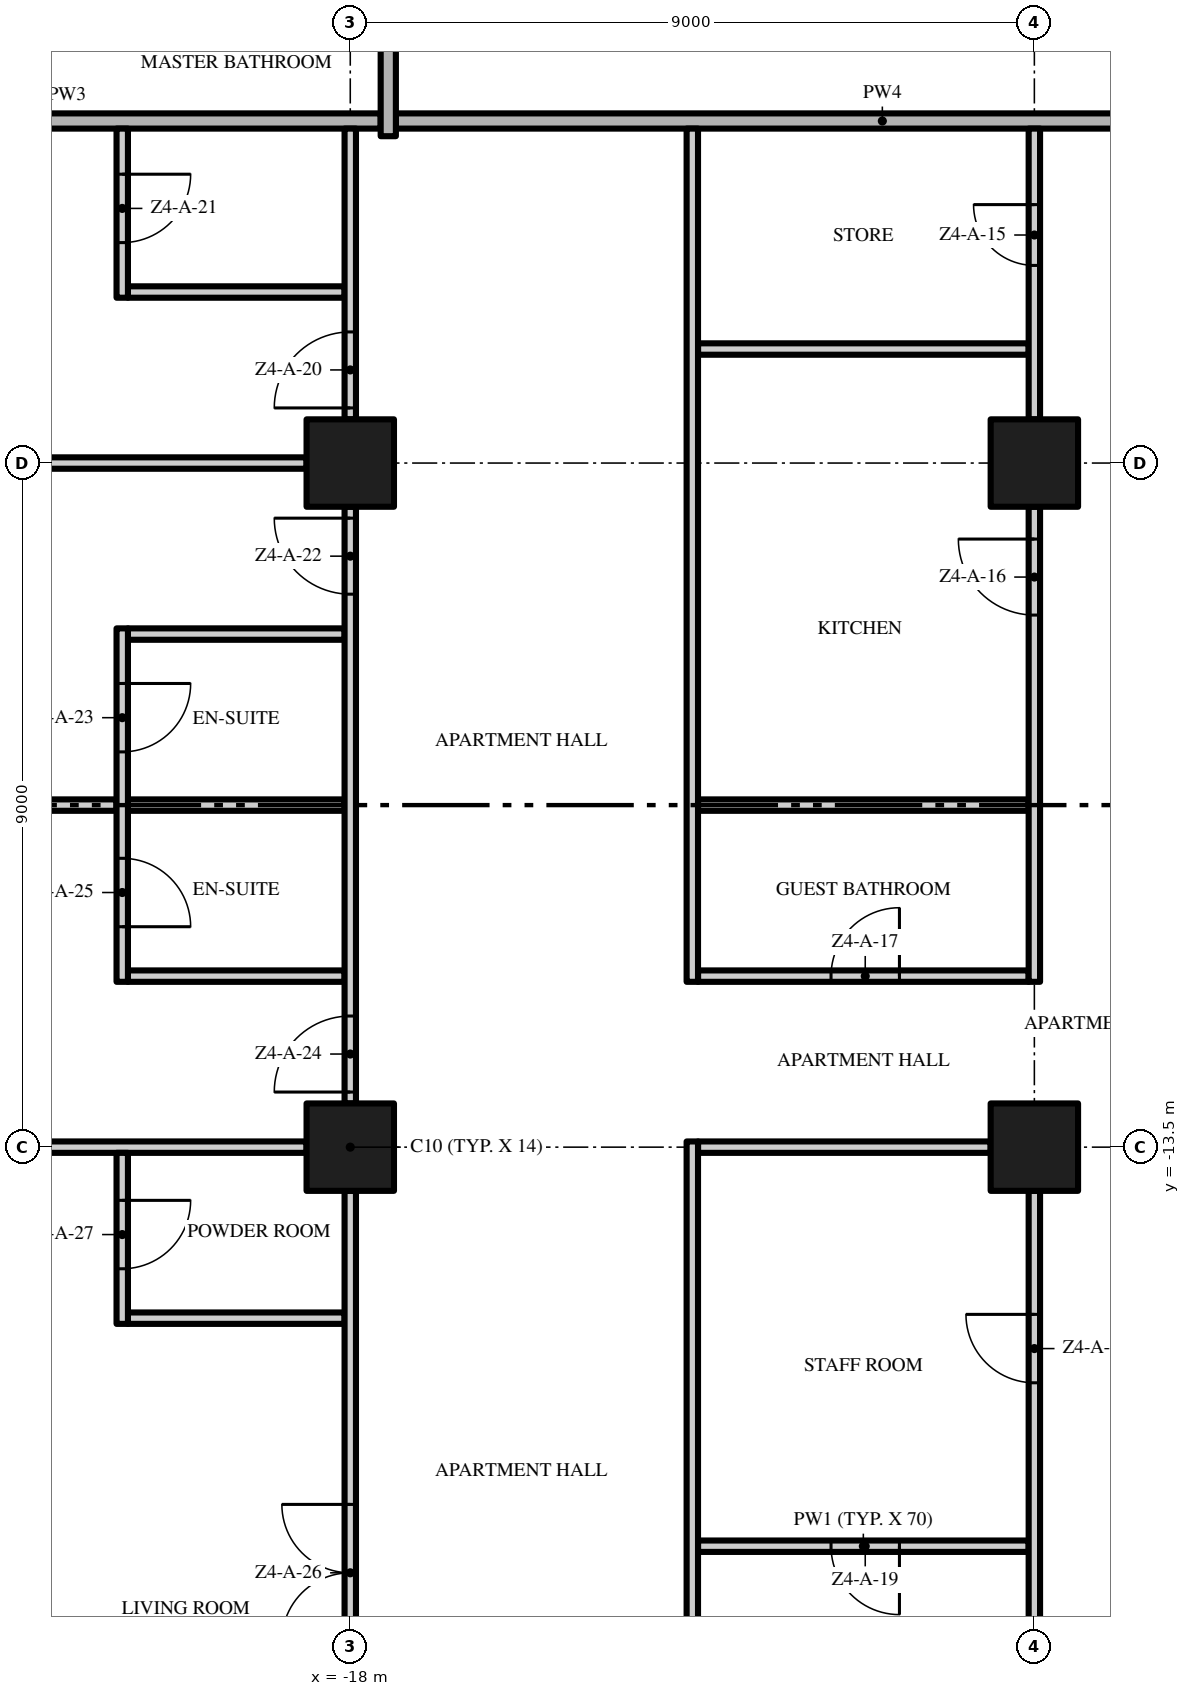
"""IFC4 building model, lengths in metres.
Left out: names, types, materials, properties, quantities, classifications, styles, units other than length and angle.
Written with IfcOpenShell. Run it as: python <this file> out.ifc"""

import sys

from ifc_helpers import new_model, si_unit, direction, frame, frame_2d, origin, origin_2d, place, context, subcontext, project, spatial, rectangle, extrude, element, fill, save


model = new_model("IFC4")
c1 = context("Model", 3, precision=1e-05, world=origin(), true_north=direction((0.0, 1.0)))
c2 = subcontext(c1, "Body", "Model", "MODEL_VIEW")
j1 = project(units=[si_unit("LENGTHUNIT", "METRE"), si_unit("PLANEANGLEUNIT", "RADIAN")], contexts=[c1])
p1 = place(None, origin())
s1 = spatial("IfcSite", under=j1, at=p1, CompositionType="ELEMENT")
p2 = place(p1, origin())
s2 = spatial("IfcBuilding", under=s1, at=p2, CompositionType="ELEMENT")
p3 = place(p2, frame((0.0, 0.0, 184.4)))
s3 = spatial("IfcBuildingStorey", under=s2, at=p3, CompositionType="ELEMENT", Elevation=184.4)
for number, where, z_axis, x_axis in (
    (1, (-18.0, -13.5, 0.0), (0.0, 0.0, 1.0), (1.0, 0.0, 0.0)),
    (2, (-18.0, -4.5, 0.0), (0.0, 0.0, 1.0), (1.0, 0.0, 0.0)),
    (3, (-9.0, -13.5, 0.0), (0.0, 0.0, 1.0), (1.0, 0.0, 0.0)),
    (4, (-9.0, -4.5, 0.0), (0.0, 0.0, 1.0), (1.0, 0.0, 0.0)),
):
    element("IfcColumn", number, at=place(p3, frame(where, z_axis=z_axis, x_axis=x_axis)), inside=s3, PredefinedType="COLUMN", context=c2, shape_type="SweptSolid", body=[
        extrude(rectangle(XDim=1.15, YDim=1.15, at=origin_2d()), origin(), (0.0, 0.0, 1.0), 3.5),
    ])
p4 = place(p3, frame((-9.075, -18.75, 0.0), z_axis=(0.0, 0.0, 1.0), x_axis=(-1.0, 0.0, 0.0)))
e5 = element("IfcWall", 5, at=p4, inside=s3, PredefinedType="PARTITIONING", context=c2, shape_type="SweptSolid", body=[
    extrude(rectangle(XDim=4.35, YDim=0.15, at=frame_2d((2.175, 0.0))), origin(), (0.0, 0.0, 1.0), 3.5),
])
p5 = place(p4, frame((1.7, 0.0, 0.0)))
e6 = element("IfcOpeningElement", 6, at=p5, cuts=e5, PredefinedType="OPENING", context=c2, shape_type="SweptSolid", body=[
    extrude(rectangle(XDim=0.9, YDim=2.1, at=frame_2d((0.45, 1.05))), frame((0.0, 0.085, 0.0), z_axis=(0.0, -1.0, 0.0), x_axis=(1.0, 0.0, 0.0)), (0.0, 0.0, 1.0), 0.17),
])
p6 = place(p3, frame((-20.925, -15.75, 0.0), z_axis=(0.0, 0.0, 1.0), x_axis=(1.0, 0.0, 0.0)))
e7 = element("IfcWall", 7, at=p6, inside=s3, PredefinedType="PARTITIONING", context=c2, shape_type="SweptSolid", body=[
    extrude(rectangle(XDim=2.85, YDim=0.15, at=frame_2d((1.425, 0.0))), origin(), (0.0, 0.0, 1.0), 3.5),
])
p7 = place(p3, frame((-25.95, -13.5, 0.0), z_axis=(0.0, 0.0, 1.0), x_axis=(1.0, 0.0, 0.0)))
e8 = element("IfcWall", 8, at=p7, inside=s3, PredefinedType="PARTITIONING", context=c2, shape_type="SweptSolid", body=[
    extrude(rectangle(XDim=7.375, YDim=0.15, at=frame_2d((3.688, 0.0))), origin(), (0.0, 0.0, 1.0), 3.5),
])
p8 = place(p3, frame((-13.425, -13.5, 0.0), z_axis=(0.0, 0.0, 1.0), x_axis=(1.0, 0.0, 0.0)))
e9 = element("IfcWall", 9, at=p8, inside=s3, PredefinedType="PARTITIONING", context=c2, shape_type="SweptSolid", body=[
    extrude(rectangle(XDim=3.85, YDim=0.15, at=frame_2d((1.925, 0.0))), origin(), (0.0, 0.0, 1.0), 3.5),
])
p9 = place(p3, frame((-20.925, -11.25, 0.0), z_axis=(0.0, 0.0, 1.0), x_axis=(1.0, 0.0, 0.0)))
e10 = element("IfcWall", 10, at=p9, inside=s3, PredefinedType="PARTITIONING", context=c2, shape_type="SweptSolid", body=[
    extrude(rectangle(XDim=2.85, YDim=0.15, at=frame_2d((1.425, 0.0))), origin(), (0.0, 0.0, 1.0), 3.5),
])
p10 = place(p3, frame((-13.425, -11.25, 0.0), z_axis=(0.0, 0.0, 1.0), x_axis=(1.0, 0.0, 0.0)))
e11 = element("IfcWall", 11, at=p10, inside=s3, PredefinedType="PARTITIONING", context=c2, shape_type="SweptSolid", body=[
    extrude(rectangle(XDim=4.35, YDim=0.15, at=frame_2d((2.175, 0.0))), origin(), (0.0, 0.0, 1.0), 3.5),
])
p11 = place(p10, frame((1.75, 0.0, 0.0)))
e12 = element("IfcOpeningElement", 12, at=p11, cuts=e11, PredefinedType="OPENING", context=c2, shape_type="SweptSolid", body=[
    extrude(rectangle(XDim=0.9, YDim=2.1, at=frame_2d((0.45, 1.05))), frame((0.0, 0.085, 0.0), z_axis=(0.0, -1.0, 0.0), x_axis=(1.0, 0.0, 0.0)), (0.0, 0.0, 1.0), 0.17),
])
p12 = place(p3, frame((-26.7, -9.0, 0.0), z_axis=(0.0, 0.0, 1.0), x_axis=(1.0, 0.0, 0.0)))
e13 = element("IfcWall", 13, at=p12, inside=s3, PredefinedType="PARTITIONING", context=c2, shape_type="SweptSolid", body=[
    extrude(rectangle(XDim=5.625, YDim=0.15, at=frame_2d((2.812, 0.0))), origin(), (0.0, 0.0, 1.0), 3.5),
])
p13 = place(p3, frame((-20.925, -9.0, 0.0), z_axis=(0.0, 0.0, 1.0), x_axis=(1.0, 0.0, 0.0)))
e14 = element("IfcWall", 14, at=p13, inside=s3, PredefinedType="PARTITIONING", context=c2, shape_type="SweptSolid", body=[
    extrude(rectangle(XDim=2.85, YDim=0.15, at=frame_2d((1.425, 0.0))), origin(), (0.0, 0.0, 1.0), 3.5),
])
p14 = place(p3, frame((-13.425, -9.0, 0.0), z_axis=(0.0, 0.0, 1.0), x_axis=(1.0, 0.0, 0.0)))
e15 = element("IfcWall", 15, at=p14, inside=s3, PredefinedType="PARTITIONING", context=c2, shape_type="SweptSolid", body=[
    extrude(rectangle(XDim=4.35, YDim=0.15, at=frame_2d((2.175, 0.0))), origin(), (0.0, 0.0, 1.0), 3.5),
])
p15 = place(p3, frame((-20.925, -6.75, 0.0), z_axis=(0.0, 0.0, 1.0), x_axis=(1.0, 0.0, 0.0)))
e16 = element("IfcWall", 16, at=p15, inside=s3, PredefinedType="PARTITIONING", context=c2, shape_type="SweptSolid", body=[
    extrude(rectangle(XDim=2.85, YDim=0.15, at=frame_2d((1.425, 0.0))), origin(), (0.0, 0.0, 1.0), 3.5),
])
p16 = place(p3, frame((-25.95, -4.5, 0.0), z_axis=(0.0, 0.0, 1.0), x_axis=(1.0, 0.0, 0.0)))
e17 = element("IfcWall", 17, at=p16, inside=s3, PredefinedType="PARTITIONING", context=c2, shape_type="SweptSolid", body=[
    extrude(rectangle(XDim=7.375, YDim=0.15, at=frame_2d((3.688, 0.0))), origin(), (0.0, 0.0, 1.0), 3.5),
])
p17 = place(p3, frame((-13.425, -3.0, 0.0), z_axis=(0.0, 0.0, 1.0), x_axis=(1.0, 0.0, 0.0)))
e18 = element("IfcWall", 18, at=p17, inside=s3, PredefinedType="PARTITIONING", context=c2, shape_type="SweptSolid", body=[
    extrude(rectangle(XDim=4.35, YDim=0.15, at=frame_2d((2.175, 0.0))), origin(), (0.0, 0.0, 1.0), 3.5),
])
p18 = place(p3, frame((-20.925, -2.25, 0.0), z_axis=(0.0, 0.0, 1.0), x_axis=(1.0, 0.0, 0.0)))
e19 = element("IfcWall", 19, at=p18, inside=s3, PredefinedType="PARTITIONING", context=c2, shape_type="SweptSolid", body=[
    extrude(rectangle(XDim=2.85, YDim=0.15, at=frame_2d((1.425, 0.0))), origin(), (0.0, 0.0, 1.0), 3.5),
])
p19 = place(p3, frame((-17.4, 0.0, 0.0), z_axis=(0.0, 0.0, 1.0), x_axis=(1.0, 0.0, 0.0)))
e20 = element("IfcWall", 20, at=p19, inside=s3, PredefinedType="PARTITIONING", context=c2, shape_type="SweptSolid", body=[
    extrude(rectangle(XDim=12.8, YDim=0.2, at=frame_2d((6.4, 0.0))), origin(), (0.0, 0.0, 1.0), 3.5),
])
p20 = place(p3, frame((-26.7, 0.0, 0.0), z_axis=(0.0, 0.0, 1.0), x_axis=(1.0, 0.0, 0.0)))
e21 = element("IfcWall", 21, at=p20, inside=s3, PredefinedType="PARTITIONING", context=c2, shape_type="SweptSolid", body=[
    extrude(rectangle(XDim=9.1, YDim=0.2, at=frame_2d((4.55, 0.0))), origin(), (0.0, 0.0, 1.0), 3.5),
])
p21 = place(p3, frame((-21.0, -13.575, 0.0), z_axis=(0.0, 0.0, 1.0), x_axis=(0.0, -1.0, 0.0)))
e22 = element("IfcWall", 22, at=p21, inside=s3, PredefinedType="PARTITIONING", context=c2, shape_type="SweptSolid", body=[
    extrude(rectangle(XDim=2.25, YDim=0.15, at=frame_2d((1.125, 0.0))), origin(), (0.0, 0.0, 1.0), 3.5),
])
p22 = place(p21, frame((0.625, 0.0, 0.0)))
e23 = element("IfcOpeningElement", 23, at=p22, cuts=e22, PredefinedType="OPENING", context=c2, shape_type="SweptSolid", body=[
    extrude(rectangle(XDim=0.9, YDim=2.1, at=frame_2d((0.45, 1.05))), frame((0.0, 0.085, 0.0), z_axis=(0.0, -1.0, 0.0), x_axis=(1.0, 0.0, 0.0)), (0.0, 0.0, 1.0), 0.17),
])
p23 = place(p3, frame((-21.0, -6.675, 0.0), z_axis=(0.0, 0.0, 1.0), x_axis=(0.0, -1.0, 0.0)))
e24 = element("IfcWall", 24, at=p23, inside=s3, PredefinedType="PARTITIONING", context=c2, shape_type="SweptSolid", body=[
    extrude(rectangle(XDim=4.65, YDim=0.15, at=frame_2d((2.325, 0.0))), origin(), (0.0, 0.0, 1.0), 3.5),
])
p24 = place(p23, frame((0.725, 0.0, 0.0)))
e25 = element("IfcOpeningElement", 25, at=p24, cuts=e24, PredefinedType="OPENING", context=c2, shape_type="SweptSolid", body=[
    extrude(rectangle(XDim=0.9, YDim=2.1, at=frame_2d((0.45, 1.05))), frame((0.0, 0.085, 0.0), z_axis=(0.0, -1.0, 0.0), x_axis=(1.0, 0.0, 0.0)), (0.0, 0.0, 1.0), 0.17),
])
p25 = place(p23, frame((3.025, 0.0, 0.0)))
e26 = element("IfcOpeningElement", 26, at=p25, cuts=e24, PredefinedType="OPENING", context=c2, shape_type="SweptSolid", body=[
    extrude(rectangle(XDim=0.9, YDim=2.1, at=frame_2d((0.45, 1.05))), frame((0.0, 0.085, 0.0), z_axis=(0.0, -1.0, 0.0), x_axis=(1.0, 0.0, 0.0)), (0.0, 0.0, 1.0), 0.17),
])
p26 = place(p3, frame((-21.0, -0.1, 0.0), z_axis=(0.0, 0.0, 1.0), x_axis=(0.0, -1.0, 0.0)))
e27 = element("IfcWall", 27, at=p26, inside=s3, PredefinedType="PARTITIONING", context=c2, shape_type="SweptSolid", body=[
    extrude(rectangle(XDim=2.225, YDim=0.15, at=frame_2d((1.113, 0.0))), origin(), (0.0, 0.0, 1.0), 3.5),
])
p27 = place(p26, frame((0.6, 0.0, 0.0)))
e28 = element("IfcOpeningElement", 28, at=p27, cuts=e27, PredefinedType="OPENING", context=c2, shape_type="SweptSolid", body=[
    extrude(rectangle(XDim=0.9, YDim=2.1, at=frame_2d((0.45, 1.05))), frame((0.0, 0.085, 0.0), z_axis=(0.0, -1.0, 0.0), x_axis=(1.0, 0.0, 0.0)), (0.0, 0.0, 1.0), 0.17),
])
p28 = place(p3, frame((-18.0, -21.45, 0.0), z_axis=(0.0, 0.0, 1.0), x_axis=(0.0, 1.0, 0.0)))
e29 = element("IfcWall", 29, at=p28, inside=s3, PredefinedType="PARTITIONING", context=c2, shape_type="SweptSolid", body=[
    extrude(rectangle(XDim=7.375, YDim=0.15, at=frame_2d((3.688, 0.0))), origin(), (0.0, 0.0, 1.0), 3.5),
])
p29 = place(p28, frame((1.45, 0.0, 0.0)))
e30 = element("IfcOpeningElement", 30, at=p29, cuts=e29, PredefinedType="OPENING", context=c2, shape_type="SweptSolid", body=[
    extrude(rectangle(XDim=1.8, YDim=2.4, at=frame_2d((0.9, 1.2))), frame((0.0, 0.085, 0.0), z_axis=(0.0, -1.0, 0.0), x_axis=(1.0, 0.0, 0.0)), (0.0, 0.0, 1.0), 0.17),
])
p30 = place(p3, frame((-18.0, -12.925, 0.0), z_axis=(0.0, 0.0, 1.0), x_axis=(0.0, 1.0, 0.0)))
e31 = element("IfcWall", 31, at=p30, inside=s3, PredefinedType="PARTITIONING", context=c2, shape_type="SweptSolid", body=[
    extrude(rectangle(XDim=7.85, YDim=0.15, at=frame_2d((3.925, 0.0))), origin(), (0.0, 0.0, 1.0), 3.5),
])
p31 = place(p30, frame((6.7, 0.0, 0.0)))
e32 = element("IfcOpeningElement", 32, at=p31, cuts=e31, PredefinedType="OPENING", context=c2, shape_type="SweptSolid", body=[
    extrude(rectangle(XDim=1.0, YDim=2.4, at=frame_2d((0.5, 1.2))), frame((0.0, 0.085, 0.0), z_axis=(0.0, -1.0, 0.0), x_axis=(1.0, 0.0, 0.0)), (0.0, 0.0, 1.0), 0.17),
])
p32 = place(p30, frame((0.15, 0.0, 0.0)))
e33 = element("IfcOpeningElement", 33, at=p32, cuts=e31, PredefinedType="OPENING", context=c2, shape_type="SweptSolid", body=[
    extrude(rectangle(XDim=1.0, YDim=2.4, at=frame_2d((0.5, 1.2))), frame((0.0, 0.085, 0.0), z_axis=(0.0, -1.0, 0.0), x_axis=(1.0, 0.0, 0.0)), (0.0, 0.0, 1.0), 0.17),
])
p33 = place(p3, frame((-18.0, -3.925, 0.0), z_axis=(0.0, 0.0, 1.0), x_axis=(0.0, 1.0, 0.0)))
e34 = element("IfcWall", 34, at=p33, inside=s3, PredefinedType="PARTITIONING", context=c2, shape_type="SweptSolid", body=[
    extrude(rectangle(XDim=3.825, YDim=0.15, at=frame_2d((1.913, 0.0))), origin(), (0.0, 0.0, 1.0), 3.5),
])
p34 = place(p33, frame((0.15, 0.0, 0.0)))
e35 = element("IfcOpeningElement", 35, at=p34, cuts=e34, PredefinedType="OPENING", context=c2, shape_type="SweptSolid", body=[
    extrude(rectangle(XDim=1.0, YDim=2.4, at=frame_2d((0.5, 1.2))), frame((0.0, 0.085, 0.0), z_axis=(0.0, -1.0, 0.0), x_axis=(1.0, 0.0, 0.0)), (0.0, 0.0, 1.0), 0.17),
])
p35 = place(p3, frame((-17.5, -0.2, 0.0), z_axis=(0.0, 0.0, 1.0), x_axis=(0.0, 1.0, 0.0)))
e36 = element("IfcWall", 36, at=p35, inside=s3, PredefinedType="PARTITIONING", context=c2, shape_type="SweptSolid", body=[
    extrude(rectangle(XDim=4.125, YDim=0.2, at=frame_2d((2.062, 0.0))), origin(), (0.0, 0.0, 1.0), 3.5),
])
p36 = place(p3, frame((-13.5, -22.2, 0.0), z_axis=(0.0, 0.0, 1.0), x_axis=(0.0, 1.0, 0.0)))
e37 = element("IfcWall", 37, at=p36, inside=s3, PredefinedType="PARTITIONING", context=c2, shape_type="SweptSolid", body=[
    extrude(rectangle(XDim=8.775, YDim=0.15, at=frame_2d((4.388, 0.0))), origin(), (0.0, 0.0, 1.0), 3.5),
])
p37 = place(p3, frame((-13.5, -11.325, 0.0), z_axis=(0.0, 0.0, 1.0), x_axis=(0.0, 1.0, 0.0)))
e38 = element("IfcWall", 38, at=p37, inside=s3, PredefinedType="PARTITIONING", context=c2, shape_type="SweptSolid", body=[
    extrude(rectangle(XDim=11.225, YDim=0.15, at=frame_2d((5.612, 0.0))), origin(), (0.0, 0.0, 1.0), 3.5),
])
p38 = place(p3, frame((-9.0, -21.45, 0.0), z_axis=(0.0, 0.0, 1.0), x_axis=(0.0, 1.0, 0.0)))
e39 = element("IfcWall", 39, at=p38, inside=s3, PredefinedType="PARTITIONING", context=c2, shape_type="SweptSolid", body=[
    extrude(rectangle(XDim=7.375, YDim=0.15, at=frame_2d((3.688, 0.0))), origin(), (0.0, 0.0, 1.0), 3.5),
])
p39 = place(p38, frame((4.85, 0.0, 0.0)))
e40 = element("IfcOpeningElement", 40, at=p39, cuts=e39, PredefinedType="OPENING", context=c2, shape_type="SweptSolid", body=[
    extrude(rectangle(XDim=0.9, YDim=2.1, at=frame_2d((0.45, 1.05))), frame((0.0, 0.085, 0.0), z_axis=(0.0, -1.0, 0.0), x_axis=(1.0, 0.0, 0.0)), (0.0, 0.0, 1.0), 0.17),
])
p40 = place(p3, frame((-9.0, -11.325, 0.0), z_axis=(0.0, 0.0, 1.0), x_axis=(0.0, 1.0, 0.0)))
e41 = element("IfcWall", 41, at=p40, inside=s3, PredefinedType="PARTITIONING", context=c2, shape_type="SweptSolid", body=[
    extrude(rectangle(XDim=6.25, YDim=0.15, at=frame_2d((3.125, 0.0))), origin(), (0.0, 0.0, 1.0), 3.5),
])
p41 = place(p40, frame((4.825, 0.0, 0.0)))
e42 = element("IfcOpeningElement", 42, at=p41, cuts=e41, PredefinedType="OPENING", context=c2, shape_type="SweptSolid", body=[
    extrude(rectangle(XDim=1.0, YDim=2.4, at=frame_2d((0.5, 1.2))), frame((0.0, 0.085, 0.0), z_axis=(0.0, -1.0, 0.0), x_axis=(1.0, 0.0, 0.0)), (0.0, 0.0, 1.0), 0.17),
])
p42 = place(p3, frame((-9.0, -3.925, 0.0), z_axis=(0.0, 0.0, 1.0), x_axis=(0.0, 1.0, 0.0)))
e43 = element("IfcWall", 43, at=p42, inside=s3, PredefinedType="PARTITIONING", context=c2, shape_type="SweptSolid", body=[
    extrude(rectangle(XDim=3.825, YDim=0.15, at=frame_2d((1.913, 0.0))), origin(), (0.0, 0.0, 1.0), 3.5),
])
p43 = place(p42, frame((2.025, 0.0, 0.0)))
e44 = element("IfcOpeningElement", 44, at=p43, cuts=e43, PredefinedType="OPENING", context=c2, shape_type="SweptSolid", body=[
    extrude(rectangle(XDim=0.8, YDim=2.0, at=frame_2d((0.4, 1.0))), frame((0.0, 0.085, 0.0), z_axis=(0.0, -1.0, 0.0), x_axis=(1.0, 0.0, 0.0)), (0.0, 0.0, 1.0), 0.17),
])
p44 = place(p43, origin())
e45 = element("IfcDoor", 45, at=p44, inside=s3, OperationType="SINGLE_SWING_RIGHT", PredefinedType="DOOR", context=c2, shape_type="SweptSolid", body=[
    extrude(rectangle(XDim=0.8, YDim=2.0, at=frame_2d((0.4, 1.0))), frame((0.0, 0.025, 0.0), z_axis=(0.0, -1.0, 0.0), x_axis=(1.0, 0.0, 0.0)), (0.0, 0.0, 1.0), 0.05),
])
fill(e44, e45)
p45 = place(p41, origin())
e46 = element("IfcDoor", 46, at=p45, inside=s3, OperationType="SINGLE_SWING_RIGHT", PredefinedType="DOOR", context=c2, shape_type="SweptSolid", body=[
    extrude(rectangle(XDim=1.0, YDim=2.4, at=frame_2d((0.5, 1.2))), frame((0.0, 0.025, 0.0), z_axis=(0.0, -1.0, 0.0), x_axis=(1.0, 0.0, 0.0)), (0.0, 0.0, 1.0), 0.05),
])
fill(e42, e46)
p46 = place(p11, origin())
e47 = element("IfcDoor", 47, at=p46, inside=s3, OperationType="SINGLE_SWING_RIGHT", PredefinedType="DOOR", context=c2, shape_type="SweptSolid", body=[
    extrude(rectangle(XDim=0.9, YDim=2.1, at=frame_2d((0.45, 1.05))), frame((0.0, 0.025, 0.0), z_axis=(0.0, -1.0, 0.0), x_axis=(1.0, 0.0, 0.0)), (0.0, 0.0, 1.0), 0.05),
])
fill(e12, e47)
p47 = place(p39, origin())
e48 = element("IfcDoor", 48, at=p47, inside=s3, OperationType="SINGLE_SWING_RIGHT", PredefinedType="DOOR", context=c2, shape_type="SweptSolid", body=[
    extrude(rectangle(XDim=0.9, YDim=2.1, at=frame_2d((0.45, 1.05))), frame((0.0, 0.025, 0.0), z_axis=(0.0, -1.0, 0.0), x_axis=(1.0, 0.0, 0.0)), (0.0, 0.0, 1.0), 0.05),
])
fill(e40, e48)
p48 = place(p5, origin())
e49 = element("IfcDoor", 49, at=p48, inside=s3, OperationType="SINGLE_SWING_LEFT", PredefinedType="DOOR", context=c2, shape_type="SweptSolid", body=[
    extrude(rectangle(XDim=0.9, YDim=2.1, at=frame_2d((0.45, 1.05))), frame((0.0, 0.025, 0.0), z_axis=(0.0, -1.0, 0.0), x_axis=(1.0, 0.0, 0.0)), (0.0, 0.0, 1.0), 0.05),
])
fill(e6, e49)
p49 = place(p34, origin())
e50 = element("IfcDoor", 50, at=p49, inside=s3, OperationType="SINGLE_SWING_LEFT", PredefinedType="DOOR", context=c2, shape_type="SweptSolid", body=[
    extrude(rectangle(XDim=1.0, YDim=2.4, at=frame_2d((0.5, 1.2))), frame((0.0, 0.025, 0.0), z_axis=(0.0, -1.0, 0.0), x_axis=(1.0, 0.0, 0.0)), (0.0, 0.0, 1.0), 0.05),
])
fill(e35, e50)
p50 = place(p27, origin())
e51 = element("IfcDoor", 51, at=p50, inside=s3, OperationType="SINGLE_SWING_LEFT", PredefinedType="DOOR", context=c2, shape_type="SweptSolid", body=[
    extrude(rectangle(XDim=0.9, YDim=2.1, at=frame_2d((0.45, 1.05))), frame((0.0, 0.025, 0.0), z_axis=(0.0, -1.0, 0.0), x_axis=(1.0, 0.0, 0.0)), (0.0, 0.0, 1.0), 0.05),
])
fill(e28, e51)
p51 = place(p31, origin())
e52 = element("IfcDoor", 52, at=p51, inside=s3, OperationType="SINGLE_SWING_RIGHT", PredefinedType="DOOR", context=c2, shape_type="SweptSolid", body=[
    extrude(rectangle(XDim=1.0, YDim=2.4, at=frame_2d((0.5, 1.2))), frame((0.0, 0.025, 0.0), z_axis=(0.0, -1.0, 0.0), x_axis=(1.0, 0.0, 0.0)), (0.0, 0.0, 1.0), 0.05),
])
fill(e32, e52)
p52 = place(p24, origin())
e53 = element("IfcDoor", 53, at=p52, inside=s3, OperationType="SINGLE_SWING_LEFT", PredefinedType="DOOR", context=c2, shape_type="SweptSolid", body=[
    extrude(rectangle(XDim=0.9, YDim=2.1, at=frame_2d((0.45, 1.05))), frame((0.0, 0.025, 0.0), z_axis=(0.0, -1.0, 0.0), x_axis=(1.0, 0.0, 0.0)), (0.0, 0.0, 1.0), 0.05),
])
fill(e25, e53)
p53 = place(p32, origin())
e54 = element("IfcDoor", 54, at=p53, inside=s3, OperationType="SINGLE_SWING_LEFT", PredefinedType="DOOR", context=c2, shape_type="SweptSolid", body=[
    extrude(rectangle(XDim=1.0, YDim=2.4, at=frame_2d((0.5, 1.2))), frame((0.0, 0.025, 0.0), z_axis=(0.0, -1.0, 0.0), x_axis=(1.0, 0.0, 0.0)), (0.0, 0.0, 1.0), 0.05),
])
fill(e33, e54)
p54 = place(p25, origin())
e55 = element("IfcDoor", 55, at=p54, inside=s3, OperationType="SINGLE_SWING_RIGHT", PredefinedType="DOOR", context=c2, shape_type="SweptSolid", body=[
    extrude(rectangle(XDim=0.9, YDim=2.1, at=frame_2d((0.45, 1.05))), frame((0.0, 0.025, 0.0), z_axis=(0.0, -1.0, 0.0), x_axis=(1.0, 0.0, 0.0)), (0.0, 0.0, 1.0), 0.05),
])
fill(e26, e55)
p55 = place(p29, origin())
e56 = element("IfcDoor", 56, at=p55, inside=s3, OperationType="DOUBLE_DOOR_SINGLE_SWING", PredefinedType="DOOR", context=c2, shape_type="SweptSolid", body=[
    extrude(rectangle(XDim=1.8, YDim=2.4, at=frame_2d((0.9, 1.2))), frame((0.0, 0.025, 0.0), z_axis=(0.0, -1.0, 0.0), x_axis=(1.0, 0.0, 0.0)), (0.0, 0.0, 1.0), 0.05),
])
fill(e30, e56)
p56 = place(p22, origin())
e57 = element("IfcDoor", 57, at=p56, inside=s3, OperationType="SINGLE_SWING_LEFT", PredefinedType="DOOR", context=c2, shape_type="SweptSolid", body=[
    extrude(rectangle(XDim=0.9, YDim=2.1, at=frame_2d((0.45, 1.05))), frame((0.0, 0.025, 0.0), z_axis=(0.0, -1.0, 0.0), x_axis=(1.0, 0.0, 0.0)), (0.0, 0.0, 1.0), 0.05),
])
fill(e23, e57)
save(model, sys.argv[1])
